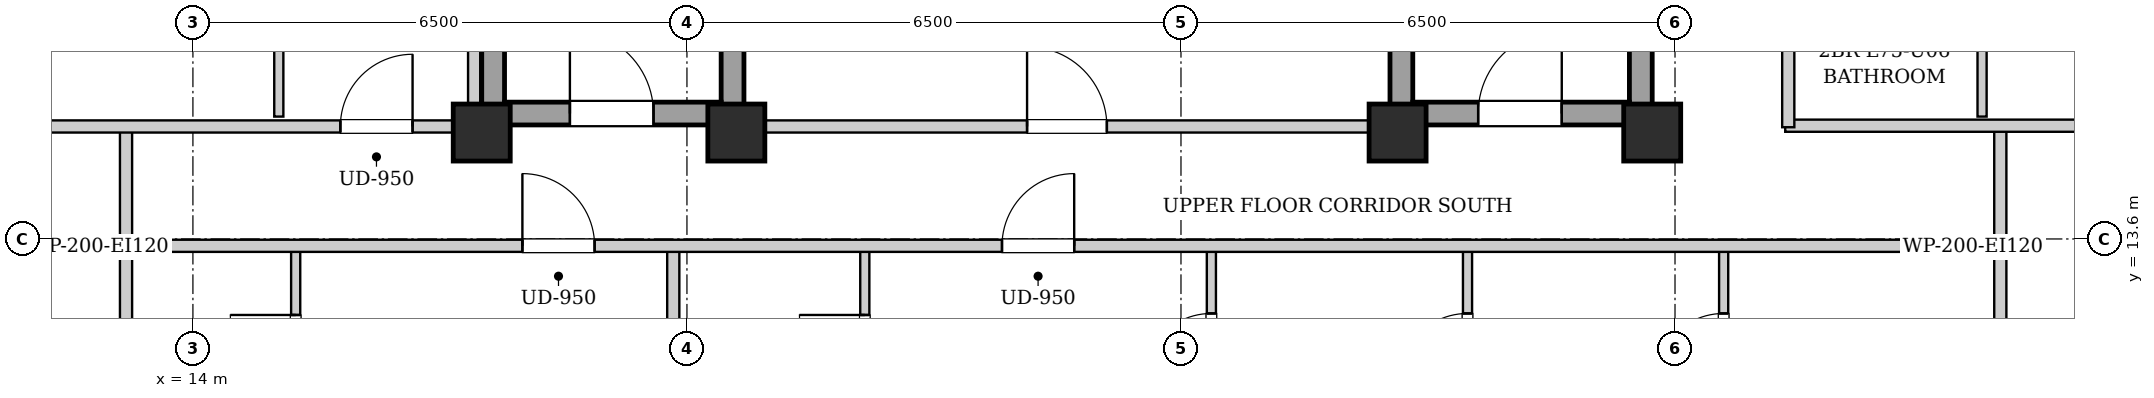
"""IFC4 building model, lengths in metres.
Left out: names, types, materials, properties, quantities, classifications, styles, units other than length and angle.
Written with IfcOpenShell. Run it as: python <this file> out.ifc"""

import sys

from ifc_helpers import new_model, si_unit, direction, frame, frame_2d, origin, origin_2d, place, context, subcontext, project, spatial, rectangle, extrude, element, fill, save


model = new_model("IFC4")
c1 = context("Model", 3, precision=1e-05, world=origin(), true_north=direction((0.0, 1.0)))
c2 = subcontext(c1, "Body", "Model", "MODEL_VIEW")
j1 = project(units=[si_unit("LENGTHUNIT", "METRE"), si_unit("PLANEANGLEUNIT", "RADIAN")], contexts=[c1])
p1 = place(None, origin())
s1 = spatial("IfcSite", under=j1, at=p1, CompositionType="ELEMENT")
p2 = place(p1, origin())
s2 = spatial("IfcBuilding", under=s1, at=p2, CompositionType="ELEMENT")
p3 = place(p2, frame((0.0, 0.0, 258.1)))
s3 = spatial("IfcBuildingStorey", under=s2, at=p3, CompositionType="ELEMENT", Elevation=258.1)
for number, where, z_axis, x_axis in (
    (1, (17.8, 15.0, 0.0), (0.0, 0.0, 1.0), (1.0, 0.0, 0.0)),
    (2, (21.15, 15.0, 0.0), (0.0, 0.0, 1.0), (1.0, 0.0, 0.0)),
    (3, (29.85, 15.0, 0.0), (0.0, 0.0, 1.0), (1.0, 0.0, 0.0)),
    (4, (33.2, 15.0, 0.0), (0.0, 0.0, 1.0), (1.0, 0.0, 0.0)),
):
    element("IfcColumn", number, at=place(p3, frame(where, z_axis=z_axis, x_axis=x_axis)), inside=s3, PredefinedType="COLUMN", context=c2, shape_type="SweptSolid", body=[
        extrude(rectangle(XDim=0.75, YDim=0.75, at=origin_2d()), origin(), (0.0, 0.0, 1.0), 3.4),
    ])
for number, where, z_axis, x_axis in (
    (5, (17.95, 15.1, 0.0), (0.0, 0.0, 1.0), (0.0, 1.0, 0.0)),
    (6, (21.1, 15.1, 0.0), (0.0, 0.0, 1.0), (0.0, 1.0, 0.0)),
):
    element("IfcWall", number, at=place(p3, frame(where, z_axis=z_axis, x_axis=x_axis)), inside=s3, PredefinedType="SHEAR", context=c2, shape_type="SweptSolid", body=[
        extrude(rectangle(XDim=9.0, YDim=0.3, at=frame_2d((4.5, 0.0))), origin(), (0.0, 0.0, 1.0), 3.05),
    ])
p4 = place(p3, frame((18.1, 15.25, 0.0), z_axis=(0.0, 0.0, 1.0), x_axis=(1.0, 0.0, 0.0)))
e7 = element("IfcWall", 7, at=p4, inside=s3, PredefinedType="SHEAR", context=c2, shape_type="SweptSolid", body=[
    extrude(rectangle(XDim=2.85, YDim=0.3, at=frame_2d((1.425, 0.0))), origin(), (0.0, 0.0, 1.0), 3.05),
])
p5 = place(p4, frame((0.86, 0.0, 0.0)))
e8 = element("IfcOpeningElement", 8, at=p5, cuts=e7, PredefinedType="OPENING", context=c2, shape_type="SweptSolid", body=[
    extrude(rectangle(XDim=1.1, YDim=2.05, at=frame_2d((0.55, 1.025))), frame((0.0, 0.16, 0.0), z_axis=(0.0, -1.0, 0.0), x_axis=(1.0, 0.0, 0.0)), (0.0, 0.0, 1.0), 0.32),
])
for number, where, z_axis, x_axis in (
    (9, (29.9, 15.1, 0.0), (0.0, 0.0, 1.0), (0.0, 1.0, 0.0)),
    (10, (33.05, 15.1, 0.0), (0.0, 0.0, 1.0), (0.0, 1.0, 0.0)),
):
    element("IfcWall", number, at=place(p3, frame(where, z_axis=z_axis, x_axis=x_axis)), inside=s3, PredefinedType="SHEAR", context=c2, shape_type="SweptSolid", body=[
        extrude(rectangle(XDim=9.0, YDim=0.3, at=frame_2d((4.5, 0.0))), origin(), (0.0, 0.0, 1.0), 3.05),
    ])
p6 = place(p3, frame((30.05, 15.25, 0.0), z_axis=(0.0, 0.0, 1.0), x_axis=(1.0, 0.0, 0.0)))
e11 = element("IfcWall", 11, at=p6, inside=s3, PredefinedType="SHEAR", context=c2, shape_type="SweptSolid", body=[
    extrude(rectangle(XDim=2.85, YDim=0.3, at=frame_2d((1.425, 0.0))), origin(), (0.0, 0.0, 1.0), 3.05),
])
p7 = place(p6, frame((0.86, 0.0, 0.0)))
e12 = element("IfcOpeningElement", 12, at=p7, cuts=e11, PredefinedType="OPENING", context=c2, shape_type="SweptSolid", body=[
    extrude(rectangle(XDim=1.1, YDim=2.05, at=frame_2d((0.55, 1.025))), frame((0.0, 0.16, 0.0), z_axis=(0.0, -1.0, 0.0), x_axis=(1.0, 0.0, 0.0)), (0.0, 0.0, 1.0), 0.32),
])
p8 = place(p3, frame((21.25, 15.08, 0.0), z_axis=(0.0, 0.0, 1.0), x_axis=(1.0, 0.0, 0.0)))
e13 = element("IfcWall", 13, at=p8, inside=s3, PredefinedType="PARTITIONING", context=c2, shape_type="SweptSolid", body=[
    extrude(rectangle(XDim=8.5, YDim=0.16, at=frame_2d((4.25, 0.0))), origin(), (0.0, 0.0, 1.0), 2.578),
])
p9 = place(p8, frame((3.725, 0.0, 0.0)))
e14 = element("IfcOpeningElement", 14, at=p9, cuts=e13, PredefinedType="OPENING", context=c2, shape_type="SweptSolid", body=[
    extrude(rectangle(XDim=1.05, YDim=2.05, at=frame_2d((0.525, 1.025))), frame((0.0, 0.09, 0.0), z_axis=(0.0, -1.0, 0.0), x_axis=(1.0, 0.0, 0.0)), (0.0, 0.0, 1.0), 0.18),
])
for number, where, z_axis, x_axis in (
    (15, (13.12, 13.51, 0.0), (0.0, 0.0, 1.0), (0.0, 1.0, 0.0)),
    (16, (37.78, 13.51, 0.0), (0.0, 0.0, 1.0), (0.0, 1.0, 0.0)),
):
    element("IfcWall", number, at=place(p3, frame(where, z_axis=z_axis, x_axis=x_axis)), inside=s3, PredefinedType="PARTITIONING", context=c2, shape_type="SweptSolid", body=[
        extrude(rectangle(XDim=1.58, YDim=0.16, at=frame_2d((0.79, 0.0))), origin(), (0.0, 0.0, 1.0), 3.05),
    ])
p10 = place(p3, frame((34.95, 15.09, 0.0), z_axis=(0.0, 0.0, 1.0), x_axis=(1.0, 0.0, 0.0)))
e17 = element("IfcWall", 17, at=p10, inside=s3, PredefinedType="PARTITIONING", context=c2, shape_type="SweptSolid", body=[
    extrude(rectangle(XDim=5.07, YDim=0.16, at=frame_2d((2.535, 0.0))), origin(), (0.0, 0.0, 1.0), 2.578),
])
p11 = place(p3, frame((13.12, 10.81, 0.0), z_axis=(0.0, 0.0, 1.0), x_axis=(0.0, 1.0, 0.0)))
e18 = element("IfcWall", 18, at=p11, inside=s3, PredefinedType="PARTITIONING", context=c2, shape_type="SweptSolid", body=[
    extrude(rectangle(XDim=2.66, YDim=0.16, at=frame_2d((1.33, 0.0))), origin(), (0.0, 0.0, 1.0), 3.05),
])
p12 = place(p3, frame((15.352, 10.87, 0.0), z_axis=(0.0, 0.0, 1.0), x_axis=(0.0, 1.0, 0.0)))
e19 = element("IfcWall", 19, at=p12, inside=s3, PredefinedType="PARTITIONING", context=c2, shape_type="SweptSolid", body=[
    extrude(rectangle(XDim=2.6, YDim=0.12, at=frame_2d((1.3, 0.0))), origin(), (0.0, 0.0, 1.0), 3.05),
])
p13 = place(p12, frame((0.87, 0.0, 0.0)))
e20 = element("IfcOpeningElement", 20, at=p13, cuts=e19, PredefinedType="OPENING", context=c2, shape_type="SweptSolid", body=[
    extrude(rectangle(XDim=0.86, YDim=2.05, at=frame_2d((0.43, 1.025))), frame((0.0, 0.07, 0.0), z_axis=(0.0, -1.0, 0.0), x_axis=(1.0, 0.0, 0.0)), (0.0, 0.0, 1.0), 0.14),
])
p14 = place(p3, frame((37.78, 10.81, 0.0), z_axis=(0.0, 0.0, 1.0), x_axis=(0.0, 1.0, 0.0)))
e21 = element("IfcWall", 21, at=p14, inside=s3, PredefinedType="PARTITIONING", context=c2, shape_type="SweptSolid", body=[
    extrude(rectangle(XDim=2.66, YDim=0.16, at=frame_2d((1.33, 0.0))), origin(), (0.0, 0.0, 1.0), 3.05),
])
p15 = place(p3, frame((20.32, 4.08, 0.0), z_axis=(0.0, 0.0, 1.0), x_axis=(0.0, 1.0, 0.0)))
e22 = element("IfcWall", 22, at=p15, inside=s3, PredefinedType="PARTITIONING", context=c2, shape_type="SweptSolid", body=[
    extrude(rectangle(XDim=9.39, YDim=0.16, at=frame_2d((4.695, 0.0))), origin(), (0.0, 0.0, 1.0), 3.05),
])
p16 = place(p3, frame((22.84, 10.87, 0.0), z_axis=(0.0, 0.0, 1.0), x_axis=(0.0, 1.0, 0.0)))
e23 = element("IfcWall", 23, at=p16, inside=s3, PredefinedType="PARTITIONING", context=c2, shape_type="SweptSolid", body=[
    extrude(rectangle(XDim=2.6, YDim=0.12, at=frame_2d((1.3, 0.0))), origin(), (0.0, 0.0, 1.0), 3.05),
])
p17 = place(p16, frame((0.87, 0.0, 0.0)))
e24 = element("IfcOpeningElement", 24, at=p17, cuts=e23, PredefinedType="OPENING", context=c2, shape_type="SweptSolid", body=[
    extrude(rectangle(XDim=0.86, YDim=2.05, at=frame_2d((0.43, 1.025))), frame((0.0, 0.07, 0.0), z_axis=(0.0, -1.0, 0.0), x_axis=(1.0, 0.0, 0.0)), (0.0, 0.0, 1.0), 0.14),
])
p18 = place(p3, frame((27.4, 10.87, 0.0), z_axis=(0.0, 0.0, 1.0), x_axis=(0.0, 1.0, 0.0)))
e25 = element("IfcWall", 25, at=p18, inside=s3, PredefinedType="PARTITIONING", context=c2, shape_type="SweptSolid", body=[
    extrude(rectangle(XDim=2.6, YDim=0.12, at=frame_2d((1.3, 0.0))), origin(), (0.0, 0.0, 1.0), 3.05),
])
p19 = place(p18, frame((0.85, 0.0, 0.0)))
e26 = element("IfcOpeningElement", 26, at=p19, cuts=e25, PredefinedType="OPENING", context=c2, shape_type="SweptSolid", body=[
    extrude(rectangle(XDim=0.9, YDim=2.05, at=frame_2d((0.45, 1.025))), frame((0.0, 0.07, 0.0), z_axis=(0.0, -1.0, 0.0), x_axis=(1.0, 0.0, 0.0)), (0.0, 0.0, 1.0), 0.14),
])
p20 = place(p3, frame((30.77, 10.87, 0.0), z_axis=(0.0, 0.0, 1.0), x_axis=(0.0, 1.0, 0.0)))
e27 = element("IfcWall", 27, at=p20, inside=s3, PredefinedType="PARTITIONING", context=c2, shape_type="SweptSolid", body=[
    extrude(rectangle(XDim=2.6, YDim=0.12, at=frame_2d((1.3, 0.0))), origin(), (0.0, 0.0, 1.0), 3.05),
])
p21 = place(p20, frame((0.85, 0.0, 0.0)))
e28 = element("IfcOpeningElement", 28, at=p21, cuts=e27, PredefinedType="OPENING", context=c2, shape_type="SweptSolid", body=[
    extrude(rectangle(XDim=0.9, YDim=2.05, at=frame_2d((0.45, 1.025))), frame((0.0, 0.07, 0.0), z_axis=(0.0, -1.0, 0.0), x_axis=(1.0, 0.0, 0.0)), (0.0, 0.0, 1.0), 0.14),
])
p22 = place(p3, frame((34.14, 10.87, 0.0), z_axis=(0.0, 0.0, 1.0), x_axis=(0.0, 1.0, 0.0)))
e29 = element("IfcWall", 29, at=p22, inside=s3, PredefinedType="PARTITIONING", context=c2, shape_type="SweptSolid", body=[
    extrude(rectangle(XDim=2.6, YDim=0.12, at=frame_2d((1.3, 0.0))), origin(), (0.0, 0.0, 1.0), 3.05),
])
p23 = place(p22, frame((0.85, 0.0, 0.0)))
e30 = element("IfcOpeningElement", 30, at=p23, cuts=e29, PredefinedType="OPENING", context=c2, shape_type="SweptSolid", body=[
    extrude(rectangle(XDim=0.9, YDim=2.05, at=frame_2d((0.45, 1.025))), frame((0.0, 0.07, 0.0), z_axis=(0.0, -1.0, 0.0), x_axis=(1.0, 0.0, 0.0)), (0.0, 0.0, 1.0), 0.14),
])
p24 = place(p3, frame((10.88, 15.08, 0.0), z_axis=(0.0, 0.0, 1.0), x_axis=(1.0, 0.0, 0.0)))
e31 = element("IfcWall", 31, at=p24, inside=s3, PredefinedType="PARTITIONING", context=c2, shape_type="SweptSolid", body=[
    extrude(rectangle(XDim=6.88, YDim=0.16, at=frame_2d((3.44, 0.0))), origin(), (0.0, 0.0, 1.0), 2.578),
])
p25 = place(p24, frame((5.06, 0.0, 0.0)))
e32 = element("IfcOpeningElement", 32, at=p25, cuts=e31, PredefinedType="OPENING", context=c2, shape_type="SweptSolid", body=[
    extrude(rectangle(XDim=0.95, YDim=2.1, at=frame_2d((0.475, 1.05))), frame((0.0, 0.09, 0.0), z_axis=(0.0, -1.0, 0.0), x_axis=(1.0, 0.0, 0.0)), (0.0, 0.0, 1.0), 0.18),
])
p26 = place(p3, frame((15.13, 15.21, 0.0), z_axis=(0.0, 0.0, 1.0), x_axis=(0.0, 1.0, 0.0)))
e33 = element("IfcWall", 33, at=p26, inside=s3, PredefinedType="PARTITIONING", context=c2, shape_type="SweptSolid", body=[
    extrude(rectangle(XDim=4.308, YDim=0.12, at=frame_2d((2.154, 0.0))), origin(), (0.0, 0.0, 1.0), 3.05),
])
p27 = place(p26, frame((1.704, 0.0, 0.0)))
e34 = element("IfcOpeningElement", 34, at=p27, cuts=e33, PredefinedType="OPENING", context=c2, shape_type="SweptSolid", body=[
    extrude(rectangle(XDim=0.9, YDim=2.05, at=frame_2d((0.45, 1.025))), frame((0.0, 0.07, 0.0), z_axis=(0.0, -1.0, 0.0), x_axis=(1.0, 0.0, 0.0)), (0.0, 0.0, 1.0), 0.14),
])
p28 = place(p3, frame((37.54, 15.21, 0.0), z_axis=(0.0, 0.0, 1.0), x_axis=(0.0, 1.0, 0.0)))
e35 = element("IfcWall", 35, at=p28, inside=s3, PredefinedType="PARTITIONING", context=c2, shape_type="SweptSolid", body=[
    extrude(rectangle(XDim=2.3, YDim=0.12, at=frame_2d((1.15, 0.0))), origin(), (0.0, 0.0, 1.0), 3.05),
])
p29 = place(p3, frame((13.15, 13.51, 0.0), z_axis=(0.0, 0.0, 1.0), x_axis=(1.0, 0.0, 0.0)))
e36 = element("IfcWall", 36, at=p29, inside=s3, PredefinedType="PARTITIONING", context=c2, shape_type="SweptSolid", body=[
    extrude(rectangle(XDim=24.6, YDim=0.16, at=frame_2d((12.3, 0.0))), origin(), (0.0, 0.0, 1.0), 3.05),
])
p30 = place(p29, frame((5.185, 0.0, 0.0)))
e37 = element("IfcOpeningElement", 37, at=p30, cuts=e36, PredefinedType="OPENING", context=c2, shape_type="SweptSolid", body=[
    extrude(rectangle(XDim=0.95, YDim=2.1, at=frame_2d((0.475, 1.05))), frame((0.0, 0.09, 0.0), z_axis=(0.0, -1.0, 0.0), x_axis=(1.0, 0.0, 0.0)), (0.0, 0.0, 1.0), 0.18),
])
p31 = place(p29, frame((11.495, 0.0, 0.0)))
e38 = element("IfcOpeningElement", 38, at=p31, cuts=e36, PredefinedType="OPENING", context=c2, shape_type="SweptSolid", body=[
    extrude(rectangle(XDim=0.95, YDim=2.1, at=frame_2d((0.475, 1.05))), frame((0.0, 0.09, 0.0), z_axis=(0.0, -1.0, 0.0), x_axis=(1.0, 0.0, 0.0)), (0.0, 0.0, 1.0), 0.18),
])
p32 = place(p3, frame((17.7, 15.02, 0.0), z_axis=(0.0, 0.0, 1.0), x_axis=(0.0, 1.0, 0.0)))
e39 = element("IfcWall", 39, at=p32, inside=s3, PredefinedType="PARTITIONING", context=c2, shape_type="SweptSolid", body=[
    extrude(rectangle(XDim=13.98, YDim=0.16, at=frame_2d((6.99, 0.0))), origin(), (0.0, 0.0, 1.0), 2.385),
])
p33 = place(p3, frame((34.99, 15.07, 0.0), z_axis=(0.0, 0.0, 1.0), x_axis=(0.0, 1.0, 0.0)))
e40 = element("IfcWall", 40, at=p33, inside=s3, PredefinedType="PARTITIONING", context=c2, shape_type="SweptSolid", body=[
    extrude(rectangle(XDim=13.93, YDim=0.16, at=frame_2d((6.965, 0.0))), origin(), (0.0, 0.0, 1.0), 3.05),
])
p34 = place(p33, frame((4.385, 0.0, 0.0)))
e41 = element("IfcOpeningElement", 41, at=p34, cuts=e40, PredefinedType="OPENING", context=c2, shape_type="SweptSolid", body=[
    extrude(rectangle(XDim=0.95, YDim=2.1, at=frame_2d((0.475, 1.05))), frame((0.0, 0.09, 0.0), z_axis=(0.0, -1.0, 0.0), x_axis=(1.0, 0.0, 0.0)), (0.0, 0.0, 1.0), 0.18),
])
p35 = place(p5, origin())
e42 = element("IfcDoor", 42, at=p35, inside=s3, OperationType="SINGLE_SWING_LEFT", PredefinedType="DOOR", context=c2, shape_type="SweptSolid", body=[
    extrude(rectangle(XDim=1.1, YDim=2.05, at=frame_2d((0.55, 1.025))), frame((0.0, 0.025, 0.0), z_axis=(0.0, -1.0, 0.0), x_axis=(1.0, 0.0, 0.0)), (0.0, 0.0, 1.0), 0.05),
])
fill(e8, e42)
p36 = place(p7, origin())
e43 = element("IfcDoor", 43, at=p36, inside=s3, OperationType="SINGLE_SWING_RIGHT", PredefinedType="DOOR", context=c2, shape_type="SweptSolid", body=[
    extrude(rectangle(XDim=1.1, YDim=2.05, at=frame_2d((0.55, 1.025))), frame((0.0, 0.025, 0.0), z_axis=(0.0, -1.0, 0.0), x_axis=(1.0, 0.0, 0.0)), (0.0, 0.0, 1.0), 0.05),
])
fill(e12, e43)
p37 = place(p9, origin())
e44 = element("IfcDoor", 44, at=p37, inside=s3, OperationType="SINGLE_SWING_LEFT", PredefinedType="DOOR", context=c2, shape_type="SweptSolid", body=[
    extrude(rectangle(XDim=1.05, YDim=2.05, at=frame_2d((0.525, 1.025))), frame((0.0, 0.025, 0.0), z_axis=(0.0, -1.0, 0.0), x_axis=(1.0, 0.0, 0.0)), (0.0, 0.0, 1.0), 0.05),
])
fill(e14, e44)
p38 = place(p13, origin())
e45 = element("IfcDoor", 45, at=p38, inside=s3, OperationType="SINGLE_SWING_RIGHT", PredefinedType="DOOR", context=c2, shape_type="SweptSolid", body=[
    extrude(rectangle(XDim=0.86, YDim=2.05, at=frame_2d((0.43, 1.025))), frame((0.0, 0.025, 0.0), z_axis=(0.0, -1.0, 0.0), x_axis=(1.0, 0.0, 0.0)), (0.0, 0.0, 1.0), 0.05),
])
fill(e20, e45)
p39 = place(p17, origin())
e46 = element("IfcDoor", 46, at=p39, inside=s3, OperationType="SINGLE_SWING_RIGHT", PredefinedType="DOOR", context=c2, shape_type="SweptSolid", body=[
    extrude(rectangle(XDim=0.86, YDim=2.05, at=frame_2d((0.43, 1.025))), frame((0.0, 0.025, 0.0), z_axis=(0.0, -1.0, 0.0), x_axis=(1.0, 0.0, 0.0)), (0.0, 0.0, 1.0), 0.05),
])
fill(e24, e46)
p40 = place(p19, origin())
e47 = element("IfcDoor", 47, at=p40, inside=s3, OperationType="SINGLE_SWING_LEFT", PredefinedType="DOOR", context=c2, shape_type="SweptSolid", body=[
    extrude(rectangle(XDim=0.9, YDim=2.05, at=frame_2d((0.45, 1.025))), frame((0.0, 0.025, 0.0), z_axis=(0.0, -1.0, 0.0), x_axis=(1.0, 0.0, 0.0)), (0.0, 0.0, 1.0), 0.05),
])
fill(e26, e47)
p41 = place(p21, origin())
e48 = element("IfcDoor", 48, at=p41, inside=s3, OperationType="SINGLE_SWING_LEFT", PredefinedType="DOOR", context=c2, shape_type="SweptSolid", body=[
    extrude(rectangle(XDim=0.9, YDim=2.05, at=frame_2d((0.45, 1.025))), frame((0.0, 0.025, 0.0), z_axis=(0.0, -1.0, 0.0), x_axis=(1.0, 0.0, 0.0)), (0.0, 0.0, 1.0), 0.05),
])
fill(e28, e48)
p42 = place(p23, origin())
e49 = element("IfcDoor", 49, at=p42, inside=s3, OperationType="SINGLE_SWING_LEFT", PredefinedType="DOOR", context=c2, shape_type="SweptSolid", body=[
    extrude(rectangle(XDim=0.9, YDim=2.05, at=frame_2d((0.45, 1.025))), frame((0.0, 0.025, 0.0), z_axis=(0.0, -1.0, 0.0), x_axis=(1.0, 0.0, 0.0)), (0.0, 0.0, 1.0), 0.05),
])
fill(e30, e49)
p43 = place(p25, origin())
e50 = element("IfcDoor", 50, at=p43, inside=s3, OperationType="SINGLE_SWING_RIGHT", PredefinedType="DOOR", context=c2, shape_type="SweptSolid", body=[
    extrude(rectangle(XDim=0.95, YDim=2.1, at=frame_2d((0.475, 1.05))), frame((0.0, 0.025, 0.0), z_axis=(0.0, -1.0, 0.0), x_axis=(1.0, 0.0, 0.0)), (0.0, 0.0, 1.0), 0.05),
])
fill(e32, e50)
p44 = place(p30, origin())
e51 = element("IfcDoor", 51, at=p44, inside=s3, OperationType="SINGLE_SWING_LEFT", PredefinedType="DOOR", context=c2, shape_type="SweptSolid", body=[
    extrude(rectangle(XDim=0.95, YDim=2.1, at=frame_2d((0.475, 1.05))), frame((0.0, 0.025, 0.0), z_axis=(0.0, -1.0, 0.0), x_axis=(1.0, 0.0, 0.0)), (0.0, 0.0, 1.0), 0.05),
])
fill(e37, e51)
p45 = place(p31, origin())
e52 = element("IfcDoor", 52, at=p45, inside=s3, OperationType="SINGLE_SWING_RIGHT", PredefinedType="DOOR", context=c2, shape_type="SweptSolid", body=[
    extrude(rectangle(XDim=0.95, YDim=2.1, at=frame_2d((0.475, 1.05))), frame((0.0, 0.025, 0.0), z_axis=(0.0, -1.0, 0.0), x_axis=(1.0, 0.0, 0.0)), (0.0, 0.0, 1.0), 0.05),
])
fill(e38, e52)
save(model, sys.argv[1])
